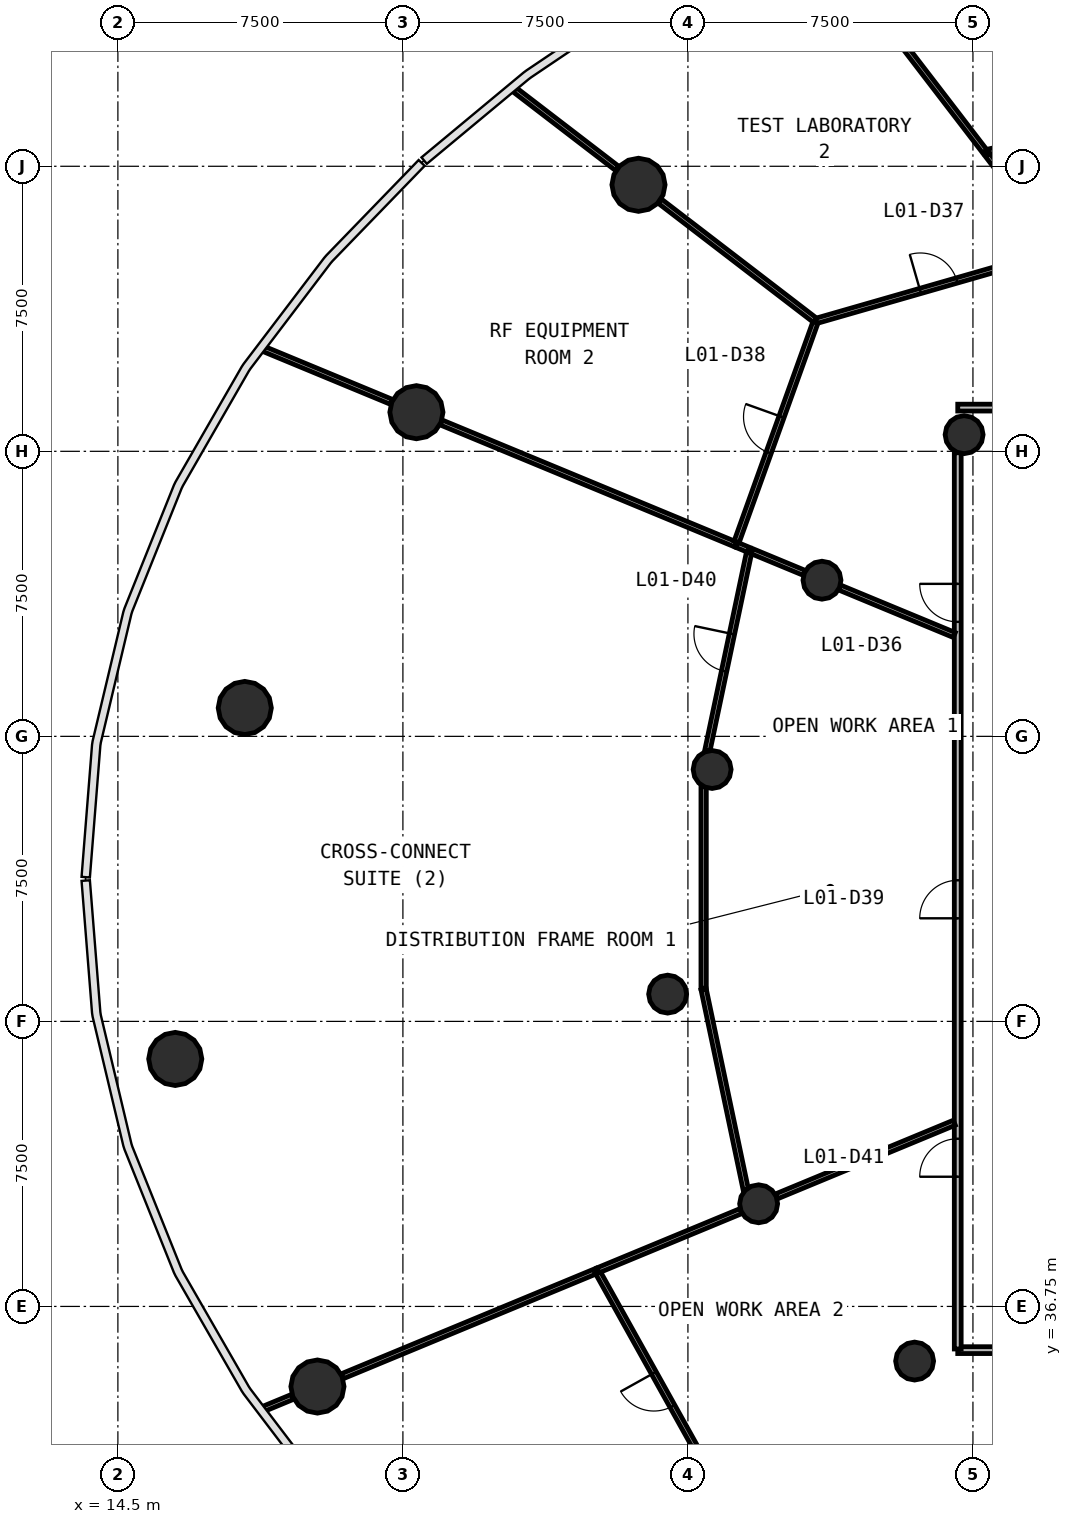
"""IFC4 building model, lengths in metres.
Left out: names, types, materials, properties, quantities, classifications, styles, units other than length and angle.
Written with IfcOpenShell. Run it as: python <this file> out.ifc"""

import sys

from ifc_helpers import new_model, si_unit, direction, frame, frame_2d, origin, origin_2d, place, context, subcontext, project, spatial, rectangle, circle, extrude, source, transform, mapped, element, fill, save


model = new_model("IFC4")
c1 = context("Model", 3, precision=1e-05, world=origin(), true_north=direction((0.0, 1.0)))
c2 = subcontext(c1, "Body", "Model", "MODEL_VIEW")
j1 = project(units=[si_unit("LENGTHUNIT", "METRE"), si_unit("PLANEANGLEUNIT", "RADIAN")], contexts=[c1])
p1 = place(None, origin())
s1 = spatial("IfcSite", under=j1, at=p1, CompositionType="ELEMENT")
p2 = place(p1, origin())
s2 = spatial("IfcBuilding", under=s1, at=p2, CompositionType="ELEMENT")
p3 = place(p2, frame((0.0, 0.0, 5.0)))
s3 = spatial("IfcBuildingStorey", under=s2, at=p3, CompositionType="ELEMENT", Elevation=5.0)
m1 = source(origin(), c2, "Body", "SweptSolid", [
    extrude(circle(Radius=0.7, at=origin_2d()), origin(), (0.0, 0.0, 1.0), 4.4),
])
for number, where, z_axis, x_axis in (
    (1, (28.199, 66.263, 0.0), (0.0, 0.0, 1.0), (1.0, 0.0, 0.0)),
    (2, (22.355, 60.279, 0.0), (0.0, 0.0, 1.0), (1.0, 0.0, 0.0)),
    (3, (17.839, 52.497, 0.0), (0.0, 0.0, 1.0), (1.0, 0.0, 0.0)),
    (4, (16.01, 43.262, 0.0), (0.0, 0.0, 1.0), (1.0, 0.0, 0.0)),
    (5, (19.751, 34.642, 0.0), (0.0, 0.0, 1.0), (1.0, 0.0, 0.0)),
):
    element("IfcColumn", number, at=place(p3, frame(where, z_axis=z_axis, x_axis=x_axis)), inside=s3, PredefinedType="COLUMN", context=c2, shape_type="MappedRepresentation", body=[
        mapped(m1, transform((0.0, 0.0, 0.0), scale=1.0)),
    ])
m2 = source(origin(), c2, "Body", "SweptSolid", [
    extrude(circle(Radius=0.5, at=origin_2d()), origin(), (0.0, 0.0, 1.0), 4.4),
])
for number, where, z_axis, x_axis in (
    (6, (36.768, 59.688, 0.0), (0.0, 0.0, 1.0), (1.0, 0.0, 0.0)),
    (7, (33.028, 55.859, 0.0), (0.0, 0.0, 1.0), (1.0, 0.0, 0.0)),
    (8, (30.137, 50.878, 0.0), (0.0, 0.0, 1.0), (1.0, 0.0, 0.0)),
    (9, (28.966, 44.968, 0.0), (0.0, 0.0, 1.0), (1.0, 0.0, 0.0)),
    (10, (31.361, 39.451, 0.0), (0.0, 0.0, 1.0), (1.0, 0.0, 0.0)),
    (11, (35.465, 35.312, 0.0), (0.0, 0.0, 1.0), (1.0, 0.0, 0.0)),
):
    element("IfcColumn", number, at=place(p3, frame(where, z_axis=z_axis, x_axis=x_axis)), inside=s3, PredefinedType="COLUMN", context=c2, shape_type="MappedRepresentation", body=[
        mapped(m2, transform((0.0, 0.0, 0.0), scale=1.0)),
    ])
p4 = place(p3, frame((67.4, 35.6, 0.0), z_axis=(0.0, 0.0, 1.0), x_axis=(-1.0, 0.0, 0.0)))
e12 = element("IfcWall", 12, at=p4, inside=s3, PredefinedType="PARTITIONING", context=c2, shape_type="SweptSolid", body=[
    extrude(rectangle(XDim=30.8, YDim=0.18, at=frame_2d((15.4, 0.0))), origin(), (0.0, 0.0, 1.0), 3.25),
])
p5 = place(p4, frame((17.35, 0.0, 0.0)))
e13 = element("IfcOpeningElement", 13, at=p5, cuts=e12, PredefinedType="OPENING", context=c2, shape_type="SweptSolid", body=[
    extrude(rectangle(XDim=1.0, YDim=2.1, at=frame_2d((0.5, 1.05))), frame((0.0, 0.1, 0.0), z_axis=(0.0, -1.0, 0.0), x_axis=(1.0, 0.0, 0.0)), (0.0, 0.0, 1.0), 0.2),
])
p6 = place(p4, frame((14.95, 0.0, 0.0)))
e14 = element("IfcOpeningElement", 14, at=p6, cuts=e12, PredefinedType="OPENING", context=c2, shape_type="SweptSolid", body=[
    extrude(rectangle(XDim=1.0, YDim=2.1, at=frame_2d((0.5, 1.05))), frame((0.0, 0.1, 0.0), z_axis=(0.0, -1.0, 0.0), x_axis=(1.0, 0.0, 0.0)), (0.0, 0.0, 1.0), 0.2),
])
p7 = place(p4, frame((8.95, 0.0, 0.0)))
e15 = element("IfcOpeningElement", 15, at=p7, cuts=e12, PredefinedType="OPENING", context=c2, shape_type="SweptSolid", body=[
    extrude(rectangle(XDim=1.0, YDim=2.1, at=frame_2d((0.5, 1.05))), frame((0.0, 0.1, 0.0), z_axis=(0.0, -1.0, 0.0), x_axis=(1.0, 0.0, 0.0)), (0.0, 0.0, 1.0), 0.2),
])
p8 = place(p3, frame((36.6, 60.4, 0.0), z_axis=(0.0, 0.0, 1.0), x_axis=(1.0, 0.0, 0.0)))
e16 = element("IfcWall", 16, at=p8, inside=s3, PredefinedType="PARTITIONING", context=c2, shape_type="SweptSolid", body=[
    extrude(rectangle(XDim=30.8, YDim=0.18, at=frame_2d((15.4, 0.0))), origin(), (0.0, 0.0, 1.0), 3.25),
])
p9 = place(p8, frame((22.25, 0.0, 0.0)))
e17 = element("IfcOpeningElement", 17, at=p9, cuts=e16, PredefinedType="OPENING", context=c2, shape_type="SweptSolid", body=[
    extrude(rectangle(XDim=0.9, YDim=2.1, at=frame_2d((0.45, 1.05))), frame((0.0, 0.1, 0.0), z_axis=(0.0, -1.0, 0.0), x_axis=(1.0, 0.0, 0.0)), (0.0, 0.0, 1.0), 0.2),
])
p10 = place(p8, frame((19.65, 0.0, 0.0)))
e18 = element("IfcOpeningElement", 18, at=p10, cuts=e16, PredefinedType="OPENING", context=c2, shape_type="SweptSolid", body=[
    extrude(rectangle(XDim=0.9, YDim=2.1, at=frame_2d((0.45, 1.05))), frame((0.0, 0.1, 0.0), z_axis=(0.0, -1.0, 0.0), x_axis=(1.0, 0.0, 0.0)), (0.0, 0.0, 1.0), 0.2),
])
p11 = place(p8, frame((17.25, 0.0, 0.0)))
e19 = element("IfcOpeningElement", 19, at=p11, cuts=e16, PredefinedType="OPENING", context=c2, shape_type="SweptSolid", body=[
    extrude(rectangle(XDim=0.9, YDim=2.1, at=frame_2d((0.45, 1.05))), frame((0.0, 0.1, 0.0), z_axis=(0.0, -1.0, 0.0), x_axis=(1.0, 0.0, 0.0)), (0.0, 0.0, 1.0), 0.2),
])
p12 = place(p8, frame((14.95, 0.0, 0.0)))
e20 = element("IfcOpeningElement", 20, at=p12, cuts=e16, PredefinedType="OPENING", context=c2, shape_type="SweptSolid", body=[
    extrude(rectangle(XDim=1.0, YDim=2.1, at=frame_2d((0.5, 1.05))), frame((0.0, 0.1, 0.0), z_axis=(0.0, -1.0, 0.0), x_axis=(1.0, 0.0, 0.0)), (0.0, 0.0, 1.0), 0.2),
])
p13 = place(p3, frame((36.6, 35.63, 0.0), z_axis=(0.0, 0.0, 1.0), x_axis=(0.0, 1.0, 0.0)))
e21 = element("IfcWall", 21, at=p13, inside=s3, PredefinedType="PARTITIONING", context=c2, shape_type="SweptSolid", body=[
    extrude(rectangle(XDim=23.583, YDim=0.18, at=frame_2d((11.791, 0.0))), origin(), (0.0, 0.0, 1.0), 3.25),
])
p14 = place(p13, frame((19.133, 0.0, 0.0)))
e22 = element("IfcOpeningElement", 22, at=p14, cuts=e21, PredefinedType="OPENING", context=c2, shape_type="SweptSolid", body=[
    extrude(rectangle(XDim=1.0, YDim=2.1, at=frame_2d((0.5, 1.05))), frame((0.0, 0.1, 0.0), z_axis=(0.0, -1.0, 0.0), x_axis=(1.0, 0.0, 0.0)), (0.0, 0.0, 1.0), 0.2),
])
p15 = place(p13, frame((11.333, 0.0, 0.0)))
e23 = element("IfcOpeningElement", 23, at=p15, cuts=e21, PredefinedType="OPENING", context=c2, shape_type="SweptSolid", body=[
    extrude(rectangle(XDim=1.0, YDim=2.1, at=frame_2d((0.5, 1.05))), frame((0.0, 0.1, 0.0), z_axis=(0.0, -1.0, 0.0), x_axis=(1.0, 0.0, 0.0)), (0.0, 0.0, 1.0), 0.2),
])
p16 = place(p13, frame((4.532, 0.0, 0.0)))
e24 = element("IfcOpeningElement", 24, at=p16, cuts=e21, PredefinedType="OPENING", context=c2, shape_type="SweptSolid", body=[
    extrude(rectangle(XDim=1.0, YDim=2.1, at=frame_2d((0.5, 1.05))), frame((0.0, 0.1, 0.0), z_axis=(0.0, -1.0, 0.0), x_axis=(1.0, 0.0, 0.0)), (0.0, 0.0, 1.0), 0.2),
])
p17 = place(p3, frame((30.757, 56.799, 0.0), z_axis=(0.0, 0.0, 1.0), x_axis=(-0.923877426418, 0.382688516884, 0.0)))
e25 = element("IfcWall", 25, at=p17, inside=s3, PredefinedType="PARTITIONING", context=c2, shape_type="SweptSolid", body=[
    extrude(rectangle(XDim=8.389, YDim=0.14, at=frame_2d((4.194, 0.0))), origin(), (0.0, 0.0, 1.0), 3.25),
])
p18 = place(p3, frame((27.105, 37.688, 0.0), z_axis=(0.0, 0.0, 1.0), x_axis=(-0.923884350367, -0.382671800824, 0.0)))
e26 = element("IfcWall", 26, at=p18, inside=s3, PredefinedType="PARTITIONING", context=c2, shape_type="SweptSolid", body=[
    extrude(rectangle(XDim=7.255, YDim=0.14, at=frame_2d((3.627, 0.0))), origin(), (0.0, 0.0, 1.0), 3.25),
])
p19 = place(p3, frame((30.522, 31.557, 0.0), z_axis=(0.0, 0.0, 1.0), x_axis=(-0.486864372852, 0.87347757982, 0.0)))
e27 = element("IfcWall", 27, at=p19, inside=s3, PredefinedType="PARTITIONING", context=c2, shape_type="SweptSolid", body=[
    extrude(rectangle(XDim=6.989, YDim=0.14, at=frame_2d((3.495, 0.0))), origin(), (0.0, 0.0, 1.0), 3.25),
])
p20 = place(p19, frame((2.939, 0.0, 0.0)))
e28 = element("IfcOpeningElement", 28, at=p20, cuts=e27, PredefinedType="OPENING", context=c2, shape_type="SweptSolid", body=[
    extrude(rectangle(XDim=1.0, YDim=2.1, at=frame_2d((0.5, 1.05))), frame((0.0, 0.08, 0.0), z_axis=(0.0, -1.0, 0.0), x_axis=(1.0, 0.0, 0.0)), (0.0, 0.0, 1.0), 0.16),
])
p21 = place(p3, frame((32.869, 62.68, 0.0), z_axis=(0.0, 0.0, 1.0), x_axis=(0.96106930393, 0.27630742488, 0.0)))
e29 = element("IfcWall", 29, at=p21, inside=s3, PredefinedType="PARTITIONING", context=c2, shape_type="SweptSolid", body=[
    extrude(rectangle(XDim=6.706, YDim=0.14, at=frame_2d((3.353, 0.0))), origin(), (0.0, 0.0, 1.0), 3.25),
])
p22 = place(p21, frame((2.856, 0.0, 0.0)))
e30 = element("IfcOpeningElement", 30, at=p22, cuts=e29, PredefinedType="OPENING", context=c2, shape_type="SweptSolid", body=[
    extrude(rectangle(XDim=1.0, YDim=2.1, at=frame_2d((0.5, 1.05))), frame((0.0, 0.08, 0.0), z_axis=(0.0, -1.0, 0.0), x_axis=(1.0, 0.0, 0.0)), (0.0, 0.0, 1.0), 0.16),
])
p23 = place(p3, frame((37.332, 67.115, 0.0), z_axis=(0.0, 0.0, 1.0), x_axis=(0.975258543616, 0.221067349702, 0.0)))
e31 = element("IfcWall", 31, at=p23, inside=s3, PredefinedType="PARTITIONING", context=c2, shape_type="SweptSolid", body=[
    extrude(rectangle(XDim=6.327, YDim=0.14, at=frame_2d((3.164, 0.0))), origin(), (0.0, 0.0, 1.0), 3.25),
])
p24 = place(p23, frame((2.677, 0.0, 0.0)))
e32 = element("IfcOpeningElement", 32, at=p24, cuts=e31, PredefinedType="OPENING", context=c2, shape_type="SweptSolid", body=[
    extrude(rectangle(XDim=1.0, YDim=2.1, at=frame_2d((0.5, 1.05))), frame((0.0, 0.08, 0.0), z_axis=(0.0, -1.0, 0.0), x_axis=(1.0, 0.0, 0.0)), (0.0, 0.0, 1.0), 0.16),
])
p25 = place(p3, frame((30.781, 56.865, 0.0), z_axis=(0.0, 0.0, 1.0), x_axis=(0.338038822493, 0.941132166323, 0.0)))
e33 = element("IfcWall", 33, at=p25, inside=s3, PredefinedType="PARTITIONING", context=c2, shape_type="SweptSolid", body=[
    extrude(rectangle(XDim=6.148, YDim=0.14, at=frame_2d((3.074, 0.0))), origin(), (0.0, 0.0, 1.0), 3.25),
])
p26 = place(p25, frame((2.498, 0.0, 0.0)))
e34 = element("IfcOpeningElement", 34, at=p26, cuts=e33, PredefinedType="OPENING", context=c2, shape_type="SweptSolid", body=[
    extrude(rectangle(XDim=1.0, YDim=2.1, at=frame_2d((0.5, 1.05))), frame((0.0, 0.08, 0.0), z_axis=(0.0, -1.0, 0.0), x_axis=(1.0, 0.0, 0.0)), (0.0, 0.0, 1.0), 0.16),
])
p27 = place(p3, frame((30.01, 51.366, 0.0), z_axis=(0.0, 0.0, 1.0), x_axis=(0.206040116916, 0.978543545388, 0.0)))
e35 = element("IfcWall", 35, at=p27, inside=s3, PredefinedType="PARTITIONING", context=c2, shape_type="SweptSolid", body=[
    extrude(rectangle(XDim=5.397, YDim=0.14, at=frame_2d((2.699, 0.0))), origin(), (0.0, 0.0, 1.0), 3.25),
])
p28 = place(p27, frame((2.147, 0.0, 0.0)))
e36 = element("IfcOpeningElement", 36, at=p28, cuts=e35, PredefinedType="OPENING", context=c2, shape_type="SweptSolid", body=[
    extrude(rectangle(XDim=1.0, YDim=2.1, at=frame_2d((0.5, 1.05))), frame((0.0, 0.08, 0.0), z_axis=(0.0, -1.0, 0.0), x_axis=(1.0, 0.0, 0.0)), (0.0, 0.0, 1.0), 0.16),
])
p29 = place(p3, frame((29.913, 45.092, 0.0), z_axis=(0.0, 0.0, 1.0), x_axis=(0.206049339712, -0.97854160341, 0.0)))
e37 = element("IfcWall", 37, at=p29, inside=s3, PredefinedType="PARTITIONING", context=c2, shape_type="SweptSolid", body=[
    extrude(rectangle(XDim=5.383, YDim=0.14, at=frame_2d((2.691, 0.0))), origin(), (0.0, 0.0, 1.0), 3.25),
])
p30 = place(p3, frame((29.913, 50.426, 0.0), z_axis=(0.0, 0.0, 1.0), x_axis=(0.0, -1.0, 0.0)))
e38 = element("IfcWall", 38, at=p30, inside=s3, PredefinedType="PARTITIONING", context=c2, shape_type="SweptSolid", body=[
    extrude(rectangle(XDim=5.304, YDim=0.14, at=frame_2d((2.652, 0.0))), origin(), (0.0, 0.0, 1.0), 3.25),
])
p31 = place(p3, frame((32.845, 62.698, 0.0), z_axis=(0.0, 0.0, 1.0), x_axis=(-0.793372133446, 0.60873693651, 0.0)))
e39 = element("IfcWall", 39, at=p31, inside=s3, PredefinedType="PARTITIONING", context=c2, shape_type="SweptSolid", body=[
    extrude(rectangle(XDim=5.152, YDim=0.14, at=frame_2d((2.576, 0.0))), origin(), (0.0, 0.0, 1.0), 3.25),
])
p32 = place(p3, frame((36.51, 41.584, 0.0), z_axis=(0.0, 0.0, 1.0), x_axis=(-0.923890025086, -0.382658100067, 0.0)))
e40 = element("IfcWall", 40, at=p32, inside=s3, PredefinedType="PARTITIONING", context=c2, shape_type="SweptSolid", body=[
    extrude(rectangle(XDim=5.068, YDim=0.14, at=frame_2d((2.534, 0.0))), origin(), (0.0, 0.0, 1.0), 3.25),
])
p33 = place(p3, frame((30.894, 39.258, 0.0), z_axis=(0.0, 0.0, 1.0), x_axis=(-0.923875045436, -0.382694264943, 0.0)))
e41 = element("IfcWall", 41, at=p33, inside=s3, PredefinedType="PARTITIONING", context=c2, shape_type="SweptSolid", body=[
    extrude(rectangle(XDim=4.071, YDim=0.14, at=frame_2d((2.036, 0.0))), origin(), (0.0, 0.0, 1.0), 3.25),
])
p34 = place(p3, frame((37.314, 67.139, 0.0), z_axis=(0.0, 0.0, 1.0), x_axis=(-0.608769216059, 0.793347365017, 0.0)))
e42 = element("IfcWall", 42, at=p34, inside=s3, PredefinedType="PARTITIONING", context=c2, shape_type="SweptSolid", body=[
    extrude(rectangle(XDim=3.749, YDim=0.14, at=frame_2d((1.874, 0.0))), origin(), (0.0, 0.0, 1.0), 3.25),
])
p35 = place(p3, frame((21.704, 60.549, 0.0), z_axis=(0.0, 0.0, 1.0), x_axis=(-0.923890168451, 0.382657753926, 0.0)))
e43 = element("IfcWall", 43, at=p35, inside=s3, PredefinedType="PARTITIONING", context=c2, shape_type="SweptSolid", body=[
    extrude(rectangle(XDim=3.641, YDim=0.14, at=frame_2d((1.821, 0.0))), origin(), (0.0, 0.0, 1.0), 3.25),
])
p36 = place(p3, frame((27.641, 66.691, 0.0), z_axis=(0.0, 0.0, 1.0), x_axis=(-0.793332688102, 0.60878834252, 0.0)))
e44 = element("IfcWall", 44, at=p36, inside=s3, PredefinedType="PARTITIONING", context=c2, shape_type="SweptSolid", body=[
    extrude(rectangle(XDim=3.404, YDim=0.14, at=frame_2d((1.702, 0.0))), origin(), (0.0, 0.0, 1.0), 3.25),
])
p37 = place(p3, frame((36.51, 54.416, 0.0), z_axis=(0.0, 0.0, 1.0), x_axis=(-0.923911109142, 0.382607190737, 0.0)))
e45 = element("IfcWall", 45, at=p37, inside=s3, PredefinedType="PARTITIONING", context=c2, shape_type="SweptSolid", body=[
    extrude(rectangle(XDim=3.264, YDim=0.14, at=frame_2d((1.632, 0.0))), origin(), (0.0, 0.0, 1.0), 3.25),
])
p38 = place(p3, frame((39.268, 64.592, 0.0), z_axis=(0.0, 0.0, 1.0), x_axis=(-0.608775029145, 0.793342904355, 0.0)))
e46 = element("IfcWall", 46, at=p38, inside=s3, PredefinedType="PARTITIONING", context=c2, shape_type="SweptSolid", body=[
    extrude(rectangle(XDim=3.103, YDim=0.14, at=frame_2d((1.552, 0.0))), origin(), (0.0, 0.0, 1.0), 3.25),
])
p39 = place(p3, frame((32.561, 56.052, 0.0), z_axis=(0.0, 0.0, 1.0), x_axis=(-0.923910723686, 0.382608121526, 0.0)))
e47 = element("IfcWall", 47, at=p39, inside=s3, PredefinedType="PARTITIONING", context=c2, shape_type="SweptSolid", body=[
    extrude(rectangle(XDim=1.486, YDim=0.14, at=frame_2d((0.743, 0.0))), origin(), (0.0, 0.0, 1.0), 3.25),
])
p40 = place(p3, frame((19.1, 34.372, 0.0), z_axis=(0.0, 0.0, 1.0), x_axis=(-0.923882954879, -0.382675169935, 0.0)))
e48 = element("IfcWall", 48, at=p40, inside=s3, PredefinedType="PARTITIONING", context=c2, shape_type="SweptSolid", body=[
    extrude(rectangle(XDim=0.822, YDim=0.14, at=frame_2d((0.411, 0.0))), origin(), (0.0, 0.0, 1.0), 3.25),
])
p41 = place(p3, frame((31.094, 56.659, 0.0), z_axis=(0.0, 0.0, 1.0), x_axis=(-0.92404344338, 0.382287476576, 0.0)))
e49 = element("IfcWall", 49, at=p41, inside=s3, PredefinedType="PARTITIONING", context=c2, shape_type="SweptSolid", body=[
    extrude(rectangle(XDim=0.335, YDim=0.14, at=frame_2d((0.167, 0.0))), origin(), (0.0, 0.0, 1.0), 3.25),
])
m3 = source(origin(), c2, "Body", "SweptSolid", [
    extrude(rectangle(XDim=1.0, YDim=2.1, at=frame_2d((0.5, 1.05))), frame((0.0, 0.025, 0.0), z_axis=(0.0, -1.0, 0.0), x_axis=(1.0, 0.0, 0.0)), (0.0, 0.0, 1.0), 0.05),
])
p42 = place(p14, origin())
e50 = element("IfcDoor", 50, at=p42, inside=s3, OperationType="SINGLE_SWING_RIGHT", PredefinedType="DOOR", context=c2, shape_type="MappedRepresentation", body=[
    mapped(m3, transform((0.0, 0.0, 0.0), scale=1.0)),
])
fill(e22, e50)
p43 = place(p22, origin())
e51 = element("IfcDoor", 51, at=p43, inside=s3, OperationType="SINGLE_SWING_LEFT", PredefinedType="DOOR", context=c2, shape_type="MappedRepresentation", body=[
    mapped(m3, transform((0.0, 0.0, 0.0), scale=1.0)),
])
fill(e30, e51)
p44 = place(p26, origin())
e52 = element("IfcDoor", 52, at=p44, inside=s3, OperationType="SINGLE_SWING_RIGHT", PredefinedType="DOOR", context=c2, shape_type="MappedRepresentation", body=[
    mapped(m3, transform((0.0, 0.0, 0.0), scale=1.0)),
])
fill(e34, e52)
p45 = place(p15, origin())
e53 = element("IfcDoor", 53, at=p45, inside=s3, OperationType="SINGLE_SWING_LEFT", PredefinedType="DOOR", context=c2, shape_type="MappedRepresentation", body=[
    mapped(m3, transform((0.0, 0.0, 0.0), scale=1.0)),
])
fill(e23, e53)
p46 = place(p28, origin())
e54 = element("IfcDoor", 54, at=p46, inside=s3, OperationType="SINGLE_SWING_RIGHT", PredefinedType="DOOR", context=c2, shape_type="MappedRepresentation", body=[
    mapped(m3, transform((0.0, 0.0, 0.0), scale=1.0)),
])
fill(e36, e54)
p47 = place(p16, origin())
e55 = element("IfcDoor", 55, at=p47, inside=s3, OperationType="SINGLE_SWING_LEFT", PredefinedType="DOOR", context=c2, shape_type="MappedRepresentation", body=[
    mapped(m3, transform((0.0, 0.0, 0.0), scale=1.0)),
])
fill(e24, e55)
p48 = place(p20, origin())
e56 = element("IfcDoor", 56, at=p48, inside=s3, OperationType="SINGLE_SWING_RIGHT", PredefinedType="DOOR", context=c2, shape_type="MappedRepresentation", body=[
    mapped(m3, transform((0.0, 0.0, 0.0), scale=1.0)),
])
fill(e28, e56)
save(model, sys.argv[1])
